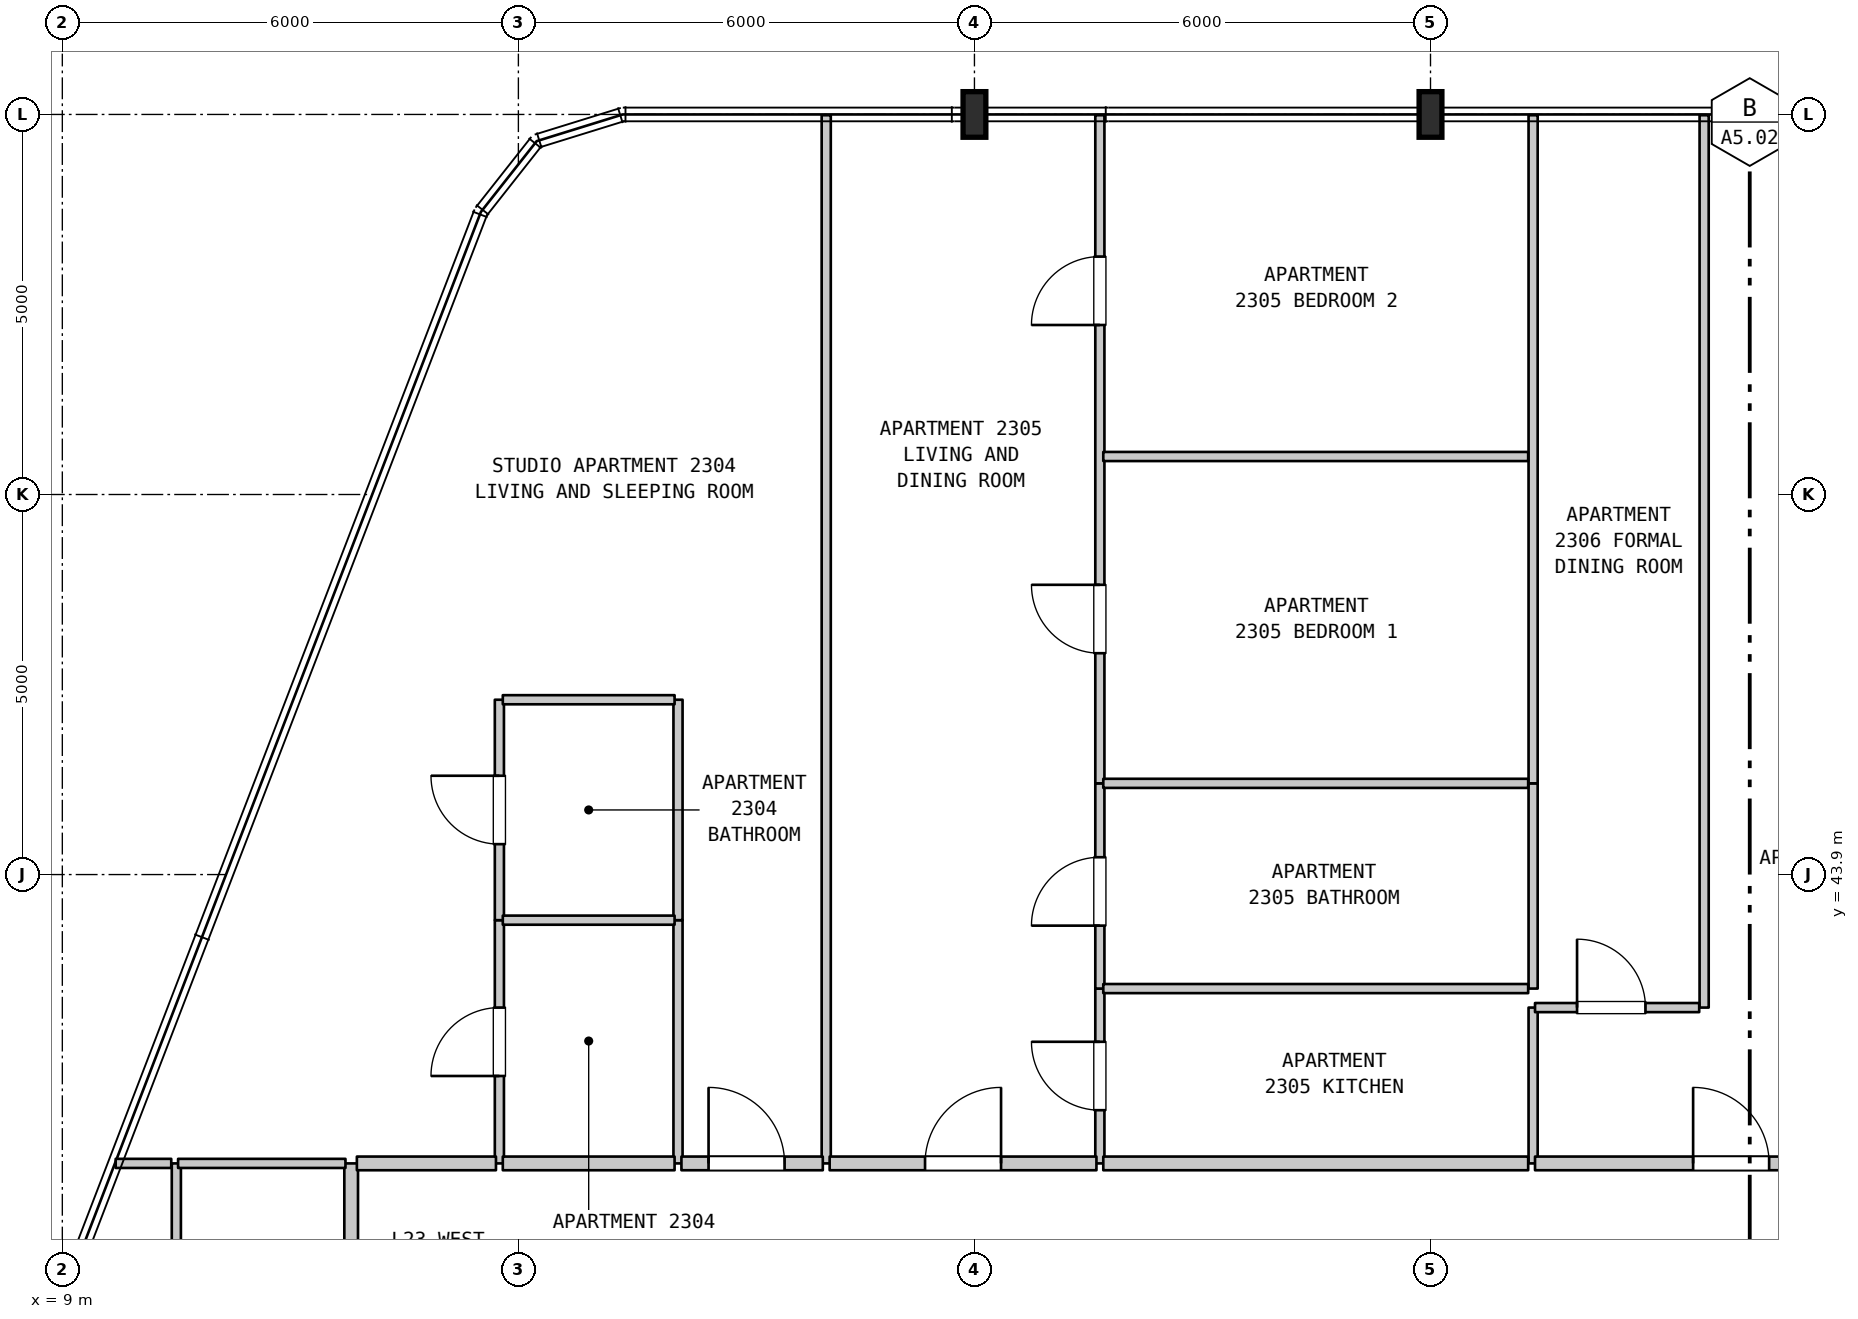
"""IFC4 building model, lengths in metres.
Left out: names, types, materials, properties, quantities, classifications, styles, units other than length and angle.
Written with IfcOpenShell. Run it as: python <this file> out.ifc"""

import sys

from ifc_helpers import new_model, si_unit, direction, frame, frame_2d, origin, origin_2d, place, context, subcontext, project, spatial, rectangle, i_section, extrude, element, fill, save


model = new_model("IFC4")
c1 = context("Model", 3, precision=1e-05, world=origin(), true_north=direction((0.0, 1.0)))
c2 = subcontext(c1, "Body", "Model", "MODEL_VIEW")
j1 = project(units=[si_unit("LENGTHUNIT", "METRE"), si_unit("PLANEANGLEUNIT", "RADIAN")], contexts=[c1])
p1 = place(None, origin())
s1 = spatial("IfcSite", under=j1, at=p1, CompositionType="ELEMENT")
p2 = place(p1, origin())
s2 = spatial("IfcBuilding", under=s1, at=p2, CompositionType="ELEMENT")
p3 = place(p2, frame((0.0, 0.0, 98.3)))
s3 = spatial("IfcBuildingStorey", under=s2, at=p3, CompositionType="ELEMENT", Elevation=98.3)
for number, where, z_axis, x_axis in (
    (1, (21.0, 53.9, 0.0), (0.0, 0.0, 1.0), (1.0, 0.0, 0.0)),
    (2, (27.0, 53.9, 0.0), (0.0, 0.0, 1.0), (1.0, 0.0, 0.0)),
):
    element("IfcColumn", number, at=place(p3, frame(where, z_axis=z_axis, x_axis=x_axis)), inside=s3, PredefinedType="COLUMN", context=c2, shape_type="SweptSolid", body=[
        extrude(i_section(OverallWidth=0.3, OverallDepth=0.6, WebThickness=0.015, FlangeThickness=0.03, FilletRadius=0.027, at=origin_2d()), origin(), (0.0, 0.0, 1.0), 3.7),
    ])
p4 = place(p3, frame((10.5, 31.45, 0.0), z_axis=(0.0, 0.0, 1.0), x_axis=(0.0, 1.0, 0.0)))
e3 = element("IfcWall", 3, at=p4, inside=s3, PredefinedType="PARTITIONING", context=c2, shape_type="SweptSolid", body=[
    extrude(rectangle(XDim=8.65, YDim=0.12, at=frame_2d((4.325, 0.0))), origin(), (0.0, 0.0, 1.0), 3.385),
])
p5 = place(p3, frame((12.8, 31.45, 0.0), z_axis=(0.0, 0.0, 1.0), x_axis=(0.0, 1.0, 0.0)))
e4 = element("IfcWall", 4, at=p5, inside=s3, PredefinedType="STANDARD", context=c2, shape_type="SweptSolid", body=[
    extrude(rectangle(XDim=8.65, YDim=0.18, at=frame_2d((4.325, 0.0))), origin(), (0.0, 0.0, 1.0), 3.385),
])
p6 = place(p3, frame((14.75, 40.1, 0.0), z_axis=(0.0, 0.0, 1.0), x_axis=(0.0, 1.0, 0.0)))
e5 = element("IfcWall", 5, at=p6, inside=s3, PredefinedType="PARTITIONING", context=c2, shape_type="SweptSolid", body=[
    extrude(rectangle(XDim=3.2, YDim=0.12, at=frame_2d((1.6, 0.0))), origin(), (0.0, 0.0, 1.0), 3.385),
])
p7 = place(p6, frame((1.15, 0.0, 0.0)))
e6 = element("IfcOpeningElement", 6, at=p7, cuts=e5, PredefinedType="OPENING", context=c2, shape_type="SweptSolid", body=[
    extrude(rectangle(XDim=0.9, YDim=2.15, at=frame_2d((0.45, 1.075))), frame((0.0, 0.07, 0.0), z_axis=(0.0, -1.0, 0.0), x_axis=(1.0, 0.0, 0.0)), (0.0, 0.0, 1.0), 0.14),
])
p8 = place(p3, frame((14.75, 43.3, 0.0), z_axis=(0.0, 0.0, 1.0), x_axis=(0.0, 1.0, 0.0)))
e7 = element("IfcWall", 7, at=p8, inside=s3, PredefinedType="PARTITIONING", context=c2, shape_type="SweptSolid", body=[
    extrude(rectangle(XDim=2.9, YDim=0.12, at=frame_2d((1.45, 0.0))), origin(), (0.0, 0.0, 1.0), 3.385),
])
p9 = place(p8, frame((1.0, 0.0, 0.0)))
e8 = element("IfcOpeningElement", 8, at=p9, cuts=e7, PredefinedType="OPENING", context=c2, shape_type="SweptSolid", body=[
    extrude(rectangle(XDim=0.9, YDim=2.1, at=frame_2d((0.45, 1.05))), frame((0.0, 0.07, 0.0), z_axis=(0.0, -1.0, 0.0), x_axis=(1.0, 0.0, 0.0)), (0.0, 0.0, 1.0), 0.14),
])
p10 = place(p3, frame((17.1, 40.1, 0.0), z_axis=(0.0, 0.0, 1.0), x_axis=(0.0, 1.0, 0.0)))
e9 = element("IfcWall", 9, at=p10, inside=s3, PredefinedType="PARTITIONING", context=c2, shape_type="SweptSolid", body=[
    extrude(rectangle(XDim=3.2, YDim=0.12, at=frame_2d((1.6, 0.0))), origin(), (0.0, 0.0, 1.0), 3.385),
])
p11 = place(p3, frame((17.1, 43.3, 0.0), z_axis=(0.0, 0.0, 1.0), x_axis=(0.0, 1.0, 0.0)))
e10 = element("IfcWall", 10, at=p11, inside=s3, PredefinedType="PARTITIONING", context=c2, shape_type="SweptSolid", body=[
    extrude(rectangle(XDim=2.9, YDim=0.12, at=frame_2d((1.45, 0.0))), origin(), (0.0, 0.0, 1.0), 3.385),
])
p12 = place(p3, frame((19.05, 40.1, 0.0), z_axis=(0.0, 0.0, 1.0), x_axis=(0.0, 1.0, 0.0)))
e11 = element("IfcWall", 11, at=p12, inside=s3, PredefinedType="PARTITIONING", context=c2, shape_type="SweptSolid", body=[
    extrude(rectangle(XDim=13.79, YDim=0.12, at=frame_2d((6.895, 0.0))), origin(), (0.0, 0.0, 1.0), 3.385),
])
p13 = place(p3, frame((22.65, 40.1, 0.0), z_axis=(0.0, 0.0, 1.0), x_axis=(0.0, 1.0, 0.0)))
e12 = element("IfcWall", 12, at=p13, inside=s3, PredefinedType="PARTITIONING", context=c2, shape_type="SweptSolid", body=[
    extrude(rectangle(XDim=2.3, YDim=0.12, at=frame_2d((1.15, 0.0))), origin(), (0.0, 0.0, 1.0), 3.385),
])
p14 = place(p13, frame((0.7, 0.0, 0.0)))
e13 = element("IfcOpeningElement", 13, at=p14, cuts=e12, PredefinedType="OPENING", context=c2, shape_type="SweptSolid", body=[
    extrude(rectangle(XDim=0.9, YDim=2.15, at=frame_2d((0.45, 1.075))), frame((0.0, 0.07, 0.0), z_axis=(0.0, -1.0, 0.0), x_axis=(1.0, 0.0, 0.0)), (0.0, 0.0, 1.0), 0.14),
])
p15 = place(p3, frame((22.65, 42.4, 0.0), z_axis=(0.0, 0.0, 1.0), x_axis=(0.0, 1.0, 0.0)))
e14 = element("IfcWall", 14, at=p15, inside=s3, PredefinedType="PARTITIONING", context=c2, shape_type="SweptSolid", body=[
    extrude(rectangle(XDim=2.7, YDim=0.12, at=frame_2d((1.35, 0.0))), origin(), (0.0, 0.0, 1.0), 3.385),
])
p16 = place(p15, frame((0.828, 0.0, 0.0)))
e15 = element("IfcOpeningElement", 15, at=p16, cuts=e14, PredefinedType="OPENING", context=c2, shape_type="SweptSolid", body=[
    extrude(rectangle(XDim=0.9, YDim=2.1, at=frame_2d((0.45, 1.05))), frame((0.0, 0.07, 0.0), z_axis=(0.0, -1.0, 0.0), x_axis=(1.0, 0.0, 0.0)), (0.0, 0.0, 1.0), 0.14),
])
p17 = place(p3, frame((22.65, 45.1, 0.0), z_axis=(0.0, 0.0, 1.0), x_axis=(0.0, 1.0, 0.0)))
e16 = element("IfcWall", 16, at=p17, inside=s3, PredefinedType="PARTITIONING", context=c2, shape_type="SweptSolid", body=[
    extrude(rectangle(XDim=8.79, YDim=0.12, at=frame_2d((4.395, 0.0))), origin(), (0.0, 0.0, 1.0), 3.385),
])
p18 = place(p17, frame((1.712, 0.0, 0.0)))
e17 = element("IfcOpeningElement", 17, at=p18, cuts=e16, PredefinedType="OPENING", context=c2, shape_type="SweptSolid", body=[
    extrude(rectangle(XDim=0.9, YDim=2.15, at=frame_2d((0.45, 1.075))), frame((0.0, 0.07, 0.0), z_axis=(0.0, -1.0, 0.0), x_axis=(1.0, 0.0, 0.0)), (0.0, 0.0, 1.0), 0.14),
])
p19 = place(p17, frame((6.03, 0.0, 0.0)))
e18 = element("IfcOpeningElement", 18, at=p19, cuts=e16, PredefinedType="OPENING", context=c2, shape_type="SweptSolid", body=[
    extrude(rectangle(XDim=0.9, YDim=2.15, at=frame_2d((0.45, 1.075))), frame((0.0, 0.07, 0.0), z_axis=(0.0, -1.0, 0.0), x_axis=(1.0, 0.0, 0.0)), (0.0, 0.0, 1.0), 0.14),
])
p20 = place(p3, frame((28.35, 40.1, 0.0), z_axis=(0.0, 0.0, 1.0), x_axis=(0.0, 1.0, 0.0)))
e19 = element("IfcWall", 19, at=p20, inside=s3, PredefinedType="PARTITIONING", context=c2, shape_type="SweptSolid", body=[
    extrude(rectangle(XDim=2.05, YDim=0.12, at=frame_2d((1.025, 0.0))), origin(), (0.0, 0.0, 1.0), 3.385),
])
p21 = place(p3, frame((28.35, 42.4, 0.0), z_axis=(0.0, 0.0, 1.0), x_axis=(0.0, 1.0, 0.0)))
e20 = element("IfcWall", 20, at=p21, inside=s3, PredefinedType="PARTITIONING", context=c2, shape_type="SweptSolid", body=[
    extrude(rectangle(XDim=2.7, YDim=0.12, at=frame_2d((1.35, 0.0))), origin(), (0.0, 0.0, 1.0), 3.385),
])
p22 = place(p3, frame((28.35, 45.1, 0.0), z_axis=(0.0, 0.0, 1.0), x_axis=(0.0, 1.0, 0.0)))
e21 = element("IfcWall", 21, at=p22, inside=s3, PredefinedType="PARTITIONING", context=c2, shape_type="SweptSolid", body=[
    extrude(rectangle(XDim=8.79, YDim=0.12, at=frame_2d((4.395, 0.0))), origin(), (0.0, 0.0, 1.0), 3.385),
])
p23 = place(p3, frame((30.6, 42.15, 0.0), z_axis=(0.0, 0.0, 1.0), x_axis=(0.0, 1.0, 0.0)))
e22 = element("IfcWall", 22, at=p23, inside=s3, PredefinedType="PARTITIONING", context=c2, shape_type="SweptSolid", body=[
    extrude(rectangle(XDim=11.74, YDim=0.12, at=frame_2d((5.87, 0.0))), origin(), (0.0, 0.0, 1.0), 3.385),
])
p24 = place(p3, frame((9.702, 40.1, 0.0), z_axis=(0.0, 0.0, 1.0), x_axis=(1.0, 0.0, 0.0)))
e23 = element("IfcWall", 23, at=p24, inside=s3, PredefinedType="PARTITIONING", context=c2, shape_type="SweptSolid", body=[
    extrude(rectangle(XDim=0.731, YDim=0.12, at=frame_2d((0.366, 0.0))), origin(), (0.0, 0.0, 1.0), 3.385),
])
p25 = place(p3, frame((10.523, 40.1, 0.0), z_axis=(0.0, 0.0, 1.0), x_axis=(1.0, 0.0, 0.0)))
e24 = element("IfcWall", 24, at=p25, inside=s3, PredefinedType="PARTITIONING", context=c2, shape_type="SweptSolid", body=[
    extrude(rectangle(XDim=2.202, YDim=0.12, at=frame_2d((1.101, 0.0))), origin(), (0.0, 0.0, 1.0), 3.385),
])
p26 = place(p3, frame((12.875, 40.1, 0.0), z_axis=(0.0, 0.0, 1.0), x_axis=(1.0, 0.0, 0.0)))
e25 = element("IfcWall", 25, at=p26, inside=s3, PredefinedType="STANDARD", context=c2, shape_type="SweptSolid", body=[
    extrude(rectangle(XDim=1.83, YDim=0.18, at=frame_2d((0.915, 0.0))), origin(), (0.0, 0.0, 1.0), 3.385),
])
p27 = place(p3, frame((14.795, 40.1, 0.0), z_axis=(0.0, 0.0, 1.0), x_axis=(1.0, 0.0, 0.0)))
e26 = element("IfcWall", 26, at=p27, inside=s3, PredefinedType="STANDARD", context=c2, shape_type="SweptSolid", body=[
    extrude(rectangle(XDim=2.26, YDim=0.18, at=frame_2d((1.13, 0.0))), origin(), (0.0, 0.0, 1.0), 3.385),
])
p28 = place(p3, frame((17.145, 40.1, 0.0), z_axis=(0.0, 0.0, 1.0), x_axis=(1.0, 0.0, 0.0)))
e27 = element("IfcWall", 27, at=p28, inside=s3, PredefinedType="STANDARD", context=c2, shape_type="SweptSolid", body=[
    extrude(rectangle(XDim=1.86, YDim=0.18, at=frame_2d((0.93, 0.0))), origin(), (0.0, 0.0, 1.0), 3.385),
])
p29 = place(p28, frame((0.357, 0.0, 0.0)))
e28 = element("IfcOpeningElement", 28, at=p29, cuts=e27, PredefinedType="OPENING", context=c2, shape_type="SweptSolid", body=[
    extrude(rectangle(XDim=1.0, YDim=2.15, at=frame_2d((0.5, 1.075))), frame((0.0, 0.1, 0.0), z_axis=(0.0, -1.0, 0.0), x_axis=(1.0, 0.0, 0.0)), (0.0, 0.0, 1.0), 0.2),
])
p30 = place(p3, frame((19.095, 40.1, 0.0), z_axis=(0.0, 0.0, 1.0), x_axis=(1.0, 0.0, 0.0)))
e29 = element("IfcWall", 29, at=p30, inside=s3, PredefinedType="STANDARD", context=c2, shape_type="SweptSolid", body=[
    extrude(rectangle(XDim=3.51, YDim=0.18, at=frame_2d((1.755, 0.0))), origin(), (0.0, 0.0, 1.0), 3.385),
])
p31 = place(p30, frame((1.255, 0.0, 0.0)))
e30 = element("IfcOpeningElement", 30, at=p31, cuts=e29, PredefinedType="OPENING", context=c2, shape_type="SweptSolid", body=[
    extrude(rectangle(XDim=1.0, YDim=2.15, at=frame_2d((0.5, 1.075))), frame((0.0, 0.1, 0.0), z_axis=(0.0, -1.0, 0.0), x_axis=(1.0, 0.0, 0.0)), (0.0, 0.0, 1.0), 0.2),
])
p32 = place(p3, frame((22.695, 40.1, 0.0), z_axis=(0.0, 0.0, 1.0), x_axis=(1.0, 0.0, 0.0)))
e31 = element("IfcWall", 31, at=p32, inside=s3, PredefinedType="STANDARD", context=c2, shape_type="SweptSolid", body=[
    extrude(rectangle(XDim=5.59, YDim=0.18, at=frame_2d((2.795, 0.0))), origin(), (0.0, 0.0, 1.0), 3.385),
])
p33 = place(p3, frame((28.375, 40.1, 0.0), z_axis=(0.0, 0.0, 1.0), x_axis=(1.0, 0.0, 0.0)))
e32 = element("IfcWall", 32, at=p33, inside=s3, PredefinedType="STANDARD", context=c2, shape_type="SweptSolid", body=[
    extrude(rectangle(XDim=5.095, YDim=0.18, at=frame_2d((2.547, 0.0))), origin(), (0.0, 0.0, 1.0), 3.385),
])
p34 = place(p33, frame((2.08, 0.0, 0.0)))
e33 = element("IfcOpeningElement", 33, at=p34, cuts=e32, PredefinedType="OPENING", context=c2, shape_type="SweptSolid", body=[
    extrude(rectangle(XDim=1.0, YDim=2.15, at=frame_2d((0.5, 1.075))), frame((0.0, 0.1, 0.0), z_axis=(0.0, -1.0, 0.0), x_axis=(1.0, 0.0, 0.0)), (0.0, 0.0, 1.0), 0.2),
])
p35 = place(p3, frame((28.375, 42.15, 0.0), z_axis=(0.0, 0.0, 1.0), x_axis=(1.0, 0.0, 0.0)))
e34 = element("IfcWall", 34, at=p35, inside=s3, PredefinedType="PARTITIONING", context=c2, shape_type="SweptSolid", body=[
    extrude(rectangle(XDim=2.16, YDim=0.12, at=frame_2d((1.08, 0.0))), origin(), (0.0, 0.0, 1.0), 3.385),
])
p36 = place(p35, frame((0.553, 0.0, 0.0)))
e35 = element("IfcOpeningElement", 35, at=p36, cuts=e34, PredefinedType="OPENING", context=c2, shape_type="SweptSolid", body=[
    extrude(rectangle(XDim=0.9, YDim=2.15, at=frame_2d((0.45, 1.075))), frame((0.0, 0.07, 0.0), z_axis=(0.0, -1.0, 0.0), x_axis=(1.0, 0.0, 0.0)), (0.0, 0.0, 1.0), 0.14),
])
p37 = place(p3, frame((22.695, 42.4, 0.0), z_axis=(0.0, 0.0, 1.0), x_axis=(1.0, 0.0, 0.0)))
e36 = element("IfcWall", 36, at=p37, inside=s3, PredefinedType="PARTITIONING", context=c2, shape_type="SweptSolid", body=[
    extrude(rectangle(XDim=5.59, YDim=0.12, at=frame_2d((2.795, 0.0))), origin(), (0.0, 0.0, 1.0), 3.385),
])
p38 = place(p3, frame((14.795, 43.3, 0.0), z_axis=(0.0, 0.0, 1.0), x_axis=(1.0, 0.0, 0.0)))
e37 = element("IfcWall", 37, at=p38, inside=s3, PredefinedType="PARTITIONING", context=c2, shape_type="SweptSolid", body=[
    extrude(rectangle(XDim=2.26, YDim=0.12, at=frame_2d((1.13, 0.0))), origin(), (0.0, 0.0, 1.0), 3.385),
])
p39 = place(p3, frame((22.695, 45.1, 0.0), z_axis=(0.0, 0.0, 1.0), x_axis=(1.0, 0.0, 0.0)))
e38 = element("IfcWall", 38, at=p39, inside=s3, PredefinedType="PARTITIONING", context=c2, shape_type="SweptSolid", body=[
    extrude(rectangle(XDim=5.59, YDim=0.12, at=frame_2d((2.795, 0.0))), origin(), (0.0, 0.0, 1.0), 3.385),
])
p40 = place(p3, frame((14.795, 46.2, 0.0), z_axis=(0.0, 0.0, 1.0), x_axis=(1.0, 0.0, 0.0)))
e39 = element("IfcWall", 39, at=p40, inside=s3, PredefinedType="PARTITIONING", context=c2, shape_type="SweptSolid", body=[
    extrude(rectangle(XDim=2.26, YDim=0.12, at=frame_2d((1.13, 0.0))), origin(), (0.0, 0.0, 1.0), 3.385),
])
p41 = place(p3, frame((22.695, 49.4, 0.0), z_axis=(0.0, 0.0, 1.0), x_axis=(1.0, 0.0, 0.0)))
e40 = element("IfcWall", 40, at=p41, inside=s3, PredefinedType="PARTITIONING", context=c2, shape_type="SweptSolid", body=[
    extrude(rectangle(XDim=5.59, YDim=0.12, at=frame_2d((2.795, 0.0))), origin(), (0.0, 0.0, 1.0), 3.385),
])
p42 = place(p7, origin())
e41 = element("IfcDoor", 41, at=p42, inside=s3, OperationType="SINGLE_SWING_LEFT", PredefinedType="DOOR", context=c2, shape_type="SweptSolid", body=[
    extrude(rectangle(XDim=0.9, YDim=2.15, at=frame_2d((0.45, 1.075))), frame((0.0, 0.025, 0.0), z_axis=(0.0, -1.0, 0.0), x_axis=(1.0, 0.0, 0.0)), (0.0, 0.0, 1.0), 0.05),
])
fill(e6, e41)
p43 = place(p9, origin())
e42 = element("IfcDoor", 42, at=p43, inside=s3, OperationType="SINGLE_SWING_RIGHT", PredefinedType="DOOR", context=c2, shape_type="SweptSolid", body=[
    extrude(rectangle(XDim=0.9, YDim=2.1, at=frame_2d((0.45, 1.05))), frame((0.0, 0.025, 0.0), z_axis=(0.0, -1.0, 0.0), x_axis=(1.0, 0.0, 0.0)), (0.0, 0.0, 1.0), 0.05),
])
fill(e8, e42)
p44 = place(p14, origin())
e43 = element("IfcDoor", 43, at=p44, inside=s3, OperationType="SINGLE_SWING_RIGHT", PredefinedType="DOOR", context=c2, shape_type="SweptSolid", body=[
    extrude(rectangle(XDim=0.9, YDim=2.15, at=frame_2d((0.45, 1.075))), frame((0.0, 0.025, 0.0), z_axis=(0.0, -1.0, 0.0), x_axis=(1.0, 0.0, 0.0)), (0.0, 0.0, 1.0), 0.05),
])
fill(e13, e43)
p45 = place(p16, origin())
e44 = element("IfcDoor", 44, at=p45, inside=s3, OperationType="SINGLE_SWING_LEFT", PredefinedType="DOOR", context=c2, shape_type="SweptSolid", body=[
    extrude(rectangle(XDim=0.9, YDim=2.1, at=frame_2d((0.45, 1.05))), frame((0.0, 0.025, 0.0), z_axis=(0.0, -1.0, 0.0), x_axis=(1.0, 0.0, 0.0)), (0.0, 0.0, 1.0), 0.05),
])
fill(e15, e44)
p46 = place(p18, origin())
e45 = element("IfcDoor", 45, at=p46, inside=s3, OperationType="SINGLE_SWING_RIGHT", PredefinedType="DOOR", context=c2, shape_type="SweptSolid", body=[
    extrude(rectangle(XDim=0.9, YDim=2.15, at=frame_2d((0.45, 1.075))), frame((0.0, 0.025, 0.0), z_axis=(0.0, -1.0, 0.0), x_axis=(1.0, 0.0, 0.0)), (0.0, 0.0, 1.0), 0.05),
])
fill(e17, e45)
p47 = place(p19, origin())
e46 = element("IfcDoor", 46, at=p47, inside=s3, OperationType="SINGLE_SWING_LEFT", PredefinedType="DOOR", context=c2, shape_type="SweptSolid", body=[
    extrude(rectangle(XDim=0.9, YDim=2.15, at=frame_2d((0.45, 1.075))), frame((0.0, 0.025, 0.0), z_axis=(0.0, -1.0, 0.0), x_axis=(1.0, 0.0, 0.0)), (0.0, 0.0, 1.0), 0.05),
])
fill(e18, e46)
p48 = place(p29, origin())
e47 = element("IfcDoor", 47, at=p48, inside=s3, OperationType="SINGLE_SWING_LEFT", PredefinedType="DOOR", context=c2, shape_type="SweptSolid", body=[
    extrude(rectangle(XDim=1.0, YDim=2.15, at=frame_2d((0.5, 1.075))), frame((0.0, 0.025, 0.0), z_axis=(0.0, -1.0, 0.0), x_axis=(1.0, 0.0, 0.0)), (0.0, 0.0, 1.0), 0.05),
])
fill(e28, e47)
p49 = place(p31, origin())
e48 = element("IfcDoor", 48, at=p49, inside=s3, OperationType="SINGLE_SWING_RIGHT", PredefinedType="DOOR", context=c2, shape_type="SweptSolid", body=[
    extrude(rectangle(XDim=1.0, YDim=2.15, at=frame_2d((0.5, 1.075))), frame((0.0, 0.025, 0.0), z_axis=(0.0, -1.0, 0.0), x_axis=(1.0, 0.0, 0.0)), (0.0, 0.0, 1.0), 0.05),
])
fill(e30, e48)
p50 = place(p34, origin())
e49 = element("IfcDoor", 49, at=p50, inside=s3, OperationType="SINGLE_SWING_LEFT", PredefinedType="DOOR", context=c2, shape_type="SweptSolid", body=[
    extrude(rectangle(XDim=1.0, YDim=2.15, at=frame_2d((0.5, 1.075))), frame((0.0, 0.025, 0.0), z_axis=(0.0, -1.0, 0.0), x_axis=(1.0, 0.0, 0.0)), (0.0, 0.0, 1.0), 0.05),
])
fill(e33, e49)
p51 = place(p36, origin())
e50 = element("IfcDoor", 50, at=p51, inside=s3, OperationType="SINGLE_SWING_LEFT", PredefinedType="DOOR", context=c2, shape_type="SweptSolid", body=[
    extrude(rectangle(XDim=0.9, YDim=2.15, at=frame_2d((0.45, 1.075))), frame((0.0, 0.025, 0.0), z_axis=(0.0, -1.0, 0.0), x_axis=(1.0, 0.0, 0.0)), (0.0, 0.0, 1.0), 0.05),
])
fill(e35, e50)
save(model, sys.argv[1])
